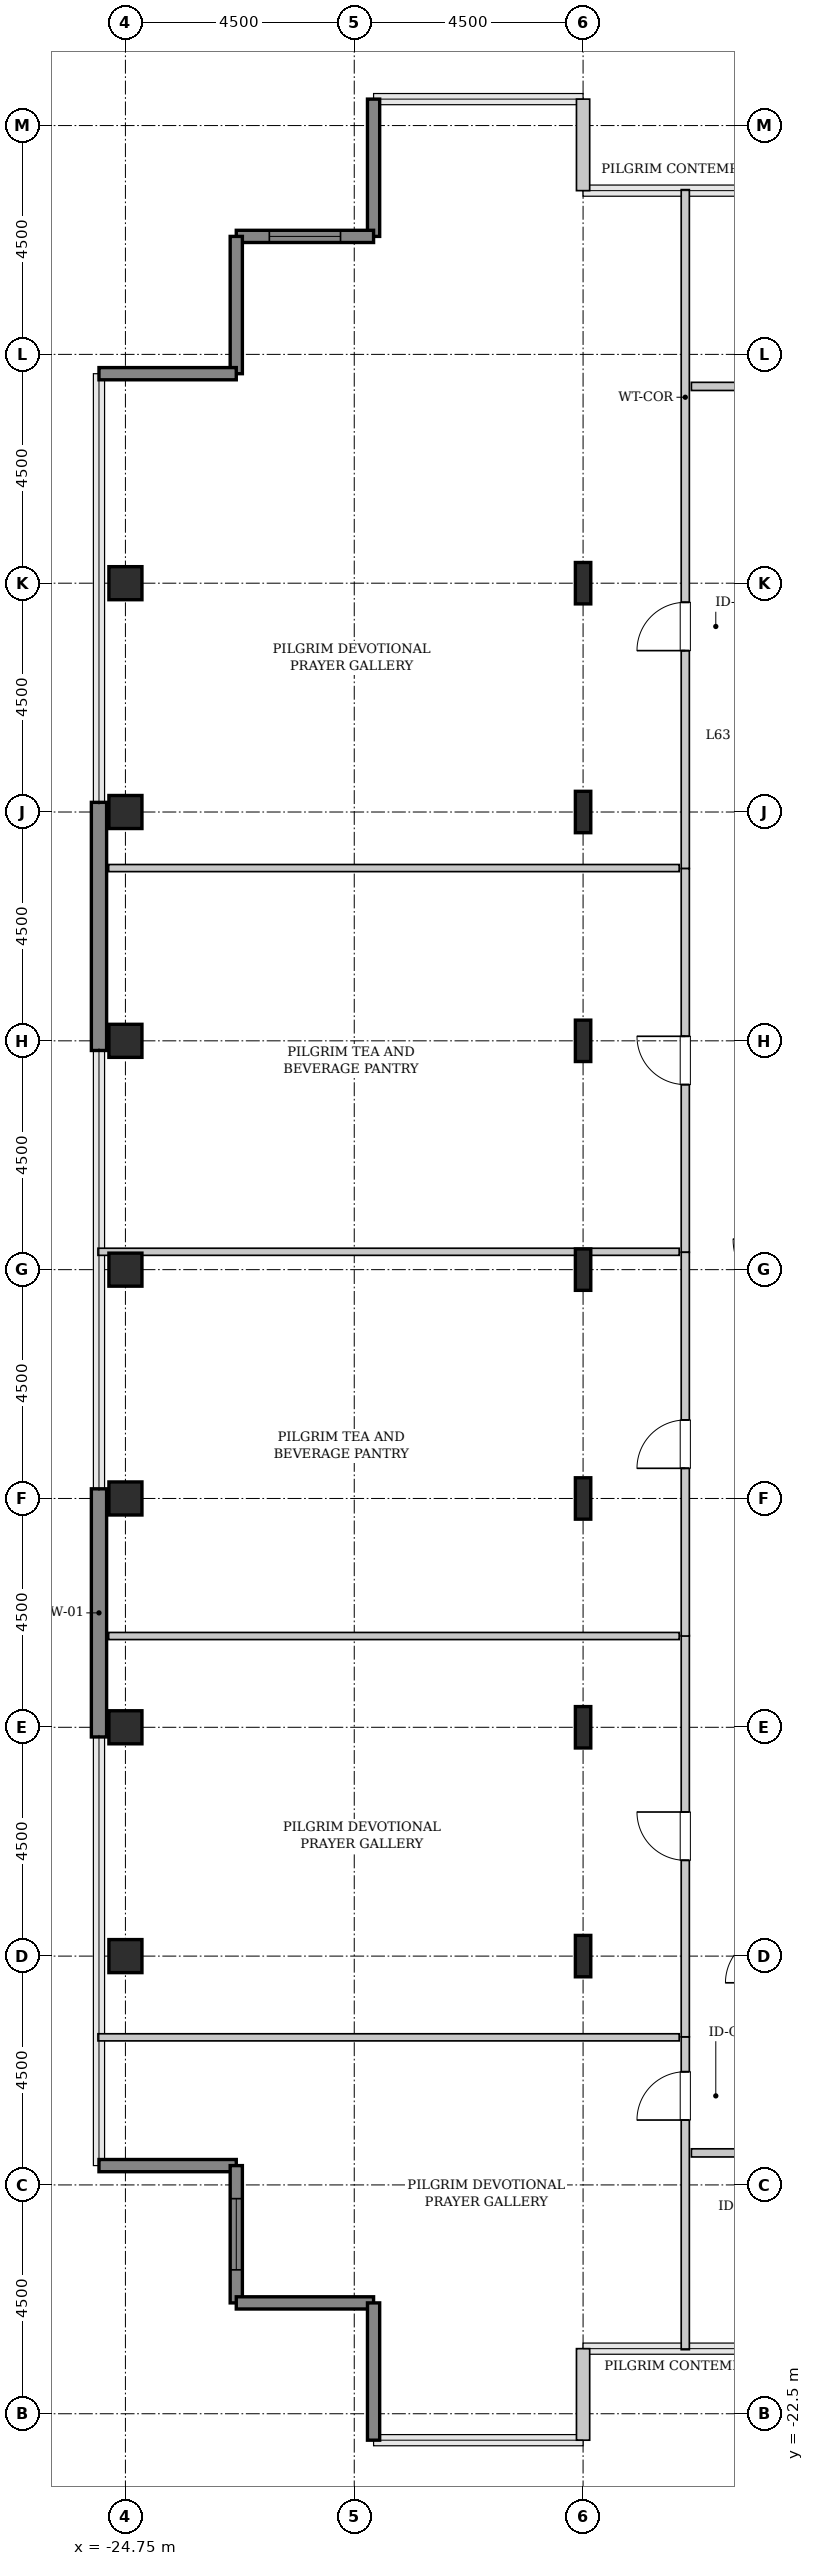
"""IFC4 building model, lengths in metres.
Left out: names, types, materials, properties, quantities, classifications, styles, units other than length and angle.
Written with IfcOpenShell. Run it as: python <this file> out.ifc"""

import sys

from ifc_helpers import new_model, si_unit, direction, frame, frame_2d, origin, origin_2d, place, context, subcontext, project, spatial, rectangle, hollow_rectangle, i_section, extrude, source, transform, mapped, element, fill, save


model = new_model("IFC4")
c1 = context("Model", 3, precision=1e-05, world=origin(), true_north=direction((0.0, 1.0)))
c2 = subcontext(c1, "Body", "Model", "MODEL_VIEW")
j1 = project(units=[si_unit("LENGTHUNIT", "METRE"), si_unit("PLANEANGLEUNIT", "RADIAN")], contexts=[c1])
p1 = place(None, origin())
s1 = spatial("IfcSite", under=j1, at=p1, CompositionType="ELEMENT")
p2 = place(p1, origin())
s2 = spatial("IfcBuilding", under=s1, at=p2, CompositionType="ELEMENT")
p3 = place(p2, frame((0.0, 0.0, 252.2)))
s3 = spatial("IfcBuildingStorey", under=s2, at=p3, CompositionType="ELEMENT", Elevation=252.2)
m1 = source(origin(), c2, "Body", "SweptSolid", [
    extrude(hollow_rectangle(XDim=0.65, YDim=0.65, WallThickness=0.032, InnerFilletRadius=0.032, OuterFilletRadius=0.064, at=origin_2d()), origin(), (0.0, 0.0, 1.0), 3.8),
])
for number, where, z_axis, x_axis in (
    (1, (-24.75, -13.5, 0.0), (0.0, 0.0, 1.0), (1.0, 0.0, 0.0)),
    (2, (-24.75, -9.0, 0.0), (0.0, 0.0, 1.0), (1.0, 0.0, 0.0)),
    (3, (-24.75, -4.5, 0.0), (0.0, 0.0, 1.0), (1.0, 0.0, 0.0)),
    (4, (-24.75, 0.0, 0.0), (0.0, 0.0, 1.0), (1.0, 0.0, 0.0)),
    (5, (-24.75, 4.5, 0.0), (0.0, 0.0, 1.0), (1.0, 0.0, 0.0)),
    (6, (-24.75, 9.0, 0.0), (0.0, 0.0, 1.0), (1.0, 0.0, 0.0)),
    (7, (-24.75, 13.5, 0.0), (0.0, 0.0, 1.0), (1.0, 0.0, 0.0)),
):
    element("IfcColumn", number, at=place(p3, frame(where, z_axis=z_axis, x_axis=x_axis)), inside=s3, PredefinedType="COLUMN", context=c2, shape_type="MappedRepresentation", body=[
        mapped(m1, transform((0.0, 0.0, 0.0), x_axis=(1.0, 0.0, 0.0), y_axis=(0.0, 1.0, 0.0), z_axis=(0.0, 0.0, 1.0), scale=1.0)),
    ])
m2 = source(origin(), c2, "Body", "SweptSolid", [
    extrude(i_section(OverallWidth=0.303, OverallDepth=0.814, WebThickness=0.021, FlangeThickness=0.04, FilletRadius=0.03, at=origin_2d()), origin(), (0.0, 0.0, 1.0), 3.8),
])
for number, where, z_axis, x_axis in (
    (8, (-15.75, -13.5, 0.0), (0.0, 0.0, 1.0), (1.0, 0.0, 0.0)),
    (9, (-15.75, -9.0, 0.0), (0.0, 0.0, 1.0), (1.0, 0.0, 0.0)),
    (10, (-15.75, -4.5, 0.0), (0.0, 0.0, 1.0), (1.0, 0.0, 0.0)),
    (11, (-15.75, 0.0, 0.0), (0.0, 0.0, 1.0), (1.0, 0.0, 0.0)),
    (12, (-15.75, 4.5, 0.0), (0.0, 0.0, 1.0), (1.0, 0.0, 0.0)),
    (13, (-15.75, 9.0, 0.0), (0.0, 0.0, 1.0), (1.0, 0.0, 0.0)),
    (14, (-15.75, 13.5, 0.0), (0.0, 0.0, 1.0), (1.0, 0.0, 0.0)),
):
    element("IfcColumn", number, at=place(p3, frame(where, z_axis=z_axis, x_axis=x_axis)), inside=s3, PredefinedType="COLUMN", context=c2, shape_type="MappedRepresentation", body=[
        mapped(m2, transform((0.0, 0.0, 0.0), x_axis=(1.0, 0.0, 0.0), y_axis=(0.0, 1.0, 0.0), z_axis=(0.0, 0.0, 1.0), scale=1.0)),
    ])
m3 = source(origin(), c2, "Body", "SweptSolid", [
    extrude(rectangle(XDim=4.88, YDim=0.3, at=frame_2d((2.44, 0.0))), origin(), (0.0, 0.0, 1.0), 3.55),
])
for number, where, z_axis, x_axis in (
    (15, (-25.27, -9.19, 0.0), (0.0, 0.0, 1.0), (0.0, 1.0, 0.0)),
    (16, (-25.27, 4.31, 0.0), (0.0, 0.0, 1.0), (0.0, 1.0, 0.0)),
):
    element("IfcWall", number, at=place(p3, frame(where, z_axis=z_axis, x_axis=x_axis)), inside=s3, PredefinedType="SHEAR", context=c2, shape_type="MappedRepresentation", body=[
        mapped(m3, transform((0.0, 0.0, 0.0), x_axis=(1.0, 0.0, 0.0), y_axis=(0.0, 1.0, 0.0), z_axis=(0.0, 0.0, 1.0), scale=1.0)),
    ])
m4 = source(origin(), c2, "Body", "SweptSolid", [
    extrude(rectangle(XDim=1.8, YDim=0.26, at=frame_2d((0.9, 0.0))), origin(), (0.0, 0.0, 1.0), 3.55),
])
p4 = place(p3, frame((-15.75, 21.22, 0.0), z_axis=(0.0, 0.0, 1.0), x_axis=(0.0, 1.0, 0.0)))
e17 = element("IfcWall", 17, at=p4, inside=s3, PredefinedType="SOLIDWALL", context=c2, shape_type="MappedRepresentation", body=[
    mapped(m4, transform((0.0, 0.0, 0.0), x_axis=(1.0, 0.0, 0.0), y_axis=(0.0, 1.0, 0.0), z_axis=(0.0, 0.0, 1.0), scale=1.0)),
])
m5 = source(origin(), c2, "Body", "SweptSolid", [
    extrude(rectangle(XDim=2.7, YDim=0.24, at=frame_2d((1.35, 0.0))), origin(), (0.0, 0.0, 1.0), 3.55),
])
p5 = place(p3, frame((-19.87, 23.02, 0.0), z_axis=(0.0, 0.0, 1.0), x_axis=(0.0, -1.0, 0.0)))
e18 = element("IfcWall", 18, at=p5, inside=s3, PredefinedType="SHEAR", context=c2, shape_type="MappedRepresentation", body=[
    mapped(m5, transform((0.0, 0.0, 0.0), x_axis=(1.0, 0.0, 0.0), y_axis=(0.0, 1.0, 0.0), z_axis=(0.0, 0.0, 1.0), scale=1.0)),
])
p6 = place(p3, frame((-19.87, 20.32, 0.0), z_axis=(0.0, 0.0, 1.0), x_axis=(-1.0, 0.0, 0.0)))
e19 = element("IfcWall", 19, at=p6, inside=s3, PredefinedType="SHEAR", context=c2, shape_type="MappedRepresentation", body=[
    mapped(m5, transform((0.0, 0.0, 0.0), x_axis=(1.0, 0.0, 0.0), y_axis=(0.0, 1.0, 0.0), z_axis=(0.0, 0.0, 1.0), scale=1.0)),
])
p7 = place(p6, frame((0.65, 0.0, 0.85)))
e20 = element("IfcOpeningElement", 20, at=p7, cuts=e19, PredefinedType="OPENING", context=c2, shape_type="SweptSolid", body=[
    extrude(rectangle(XDim=1.4, YDim=1.8, at=frame_2d((0.7, 0.9))), frame((0.0, 0.13, 0.0), z_axis=(0.0, -1.0, 0.0), x_axis=(1.0, 0.0, 0.0)), (0.0, 0.0, 1.0), 0.26),
])
for number, where, z_axis, x_axis in (
    (21, (-22.57, 20.32, 0.0), (0.0, 0.0, 1.0), (0.0, -1.0, 0.0)),
    (22, (-22.57, 17.62, 0.0), (0.0, 0.0, 1.0), (-1.0, 0.0, 0.0)),
    (23, (-25.27, -17.62, 0.0), (0.0, 0.0, 1.0), (1.0, 0.0, 0.0)),
):
    element("IfcWall", number, at=place(p3, frame(where, z_axis=z_axis, x_axis=x_axis)), inside=s3, PredefinedType="SHEAR", context=c2, shape_type="MappedRepresentation", body=[
        mapped(m5, transform((0.0, 0.0, 0.0), x_axis=(1.0, 0.0, 0.0), y_axis=(0.0, 1.0, 0.0), z_axis=(0.0, 0.0, 1.0), scale=1.0)),
    ])
p8 = place(p3, frame((-22.57, -17.62, 0.0), z_axis=(0.0, 0.0, 1.0), x_axis=(0.0, -1.0, 0.0)))
e24 = element("IfcWall", 24, at=p8, inside=s3, PredefinedType="SHEAR", context=c2, shape_type="MappedRepresentation", body=[
    mapped(m5, transform((0.0, 0.0, 0.0), x_axis=(1.0, 0.0, 0.0), y_axis=(0.0, 1.0, 0.0), z_axis=(0.0, 0.0, 1.0), scale=1.0)),
])
p9 = place(p8, frame((0.65, 0.0, 0.85)))
e25 = element("IfcOpeningElement", 25, at=p9, cuts=e24, PredefinedType="OPENING", context=c2, shape_type="SweptSolid", body=[
    extrude(rectangle(XDim=1.4, YDim=1.8, at=frame_2d((0.7, 0.9))), frame((0.0, 0.13, 0.0), z_axis=(0.0, -1.0, 0.0), x_axis=(1.0, 0.0, 0.0)), (0.0, 0.0, 1.0), 0.26),
])
for number, where, z_axis, x_axis in (
    (26, (-22.57, -20.32, 0.0), (0.0, 0.0, 1.0), (1.0, 0.0, 0.0)),
    (27, (-19.87, -20.32, 0.0), (0.0, 0.0, 1.0), (0.0, -1.0, 0.0)),
):
    element("IfcWall", number, at=place(p3, frame(where, z_axis=z_axis, x_axis=x_axis)), inside=s3, PredefinedType="SHEAR", context=c2, shape_type="MappedRepresentation", body=[
        mapped(m5, transform((0.0, 0.0, 0.0), x_axis=(1.0, 0.0, 0.0), y_axis=(0.0, 1.0, 0.0), z_axis=(0.0, 0.0, 1.0), scale=1.0)),
    ])
p10 = place(p3, frame((-15.75, -23.02, 0.0), z_axis=(0.0, 0.0, 1.0), x_axis=(0.0, 1.0, 0.0)))
e28 = element("IfcWall", 28, at=p10, inside=s3, PredefinedType="SOLIDWALL", context=c2, shape_type="MappedRepresentation", body=[
    mapped(m4, transform((0.0, 0.0, 0.0), x_axis=(1.0, 0.0, 0.0), y_axis=(0.0, 1.0, 0.0), z_axis=(0.0, 0.0, 1.0), scale=1.0)),
])
m6 = source(origin(), c2, "Body", "SweptSolid", [
    extrude(rectangle(XDim=6.153, YDim=0.16, at=frame_2d((3.076, 0.0))), origin(), (0.0, 0.0, 1.0), 3.535),
])
p11 = place(p3, frame((-13.74, -21.24, 0.0), z_axis=(0.0, 0.0, 1.0), x_axis=(0.0, 1.0, 0.0)))
e29 = element("IfcWall", 29, at=p11, inside=s3, PredefinedType="PARTITIONING", context=c2, shape_type="MappedRepresentation", body=[
    mapped(m6, transform((0.0, 0.0, 0.0), x_axis=(1.0, 0.0, 0.0), y_axis=(0.0, 1.0, 0.0), z_axis=(0.0, 0.0, 1.0), scale=1.0)),
])
p12 = place(p11, frame((4.516, 0.0, 0.0)))
e30 = element("IfcOpeningElement", 30, at=p12, cuts=e29, PredefinedType="OPENING", context=c2, shape_type="SweptSolid", body=[
    extrude(rectangle(XDim=0.95, YDim=2.1, at=frame_2d((0.475, 1.05))), frame((0.0, 0.09, 0.0), z_axis=(0.0, -1.0, 0.0), x_axis=(1.0, 0.0, 0.0)), (0.0, 0.0, 1.0), 0.18),
])
m7 = source(origin(), c2, "Body", "SweptSolid", [
    extrude(rectangle(XDim=11.43, YDim=0.14, at=frame_2d((5.715, 0.0))), origin(), (0.0, 0.0, 1.0), 3.535),
])
p13 = place(p3, frame((-25.29, -15.097, 0.0), z_axis=(0.0, 0.0, 1.0), x_axis=(1.0, 0.0, 0.0)))
e31 = element("IfcWall", 31, at=p13, inside=s3, PredefinedType="PARTITIONING", context=c2, shape_type="MappedRepresentation", body=[
    mapped(m7, transform((0.0, 0.0, 0.0), x_axis=(1.0, 0.0, 0.0), y_axis=(0.0, 1.0, 0.0), z_axis=(0.0, 0.0, 1.0), scale=1.0)),
])
m8 = source(origin(), c2, "Body", "SweptSolid", [
    extrude(rectangle(XDim=7.892, YDim=0.16, at=frame_2d((3.946, 0.0))), origin(), (0.0, 0.0, 1.0), 3.535),
])
p14 = place(p3, frame((-13.74, -15.087, 0.0), z_axis=(0.0, 0.0, 1.0), x_axis=(0.0, 1.0, 0.0)))
e32 = element("IfcWall", 32, at=p14, inside=s3, PredefinedType="PARTITIONING", context=c2, shape_type="MappedRepresentation", body=[
    mapped(m8, transform((0.0, 0.0, 0.0), x_axis=(1.0, 0.0, 0.0), y_axis=(0.0, 1.0, 0.0), z_axis=(0.0, 0.0, 1.0), scale=1.0)),
])
p15 = place(p14, frame((3.471, 0.0, 0.0)))
e33 = element("IfcOpeningElement", 33, at=p15, cuts=e32, PredefinedType="OPENING", context=c2, shape_type="SweptSolid", body=[
    extrude(rectangle(XDim=0.95, YDim=2.1, at=frame_2d((0.475, 1.05))), frame((0.0, 0.09, 0.0), z_axis=(0.0, -1.0, 0.0), x_axis=(1.0, 0.0, 0.0)), (0.0, 0.0, 1.0), 0.18),
])
m9 = source(origin(), c2, "Body", "SweptSolid", [
    extrude(rectangle(XDim=11.22, YDim=0.14, at=frame_2d((5.61, 0.0))), origin(), (0.0, 0.0, 1.0), 3.535),
])
p16 = place(p3, frame((-25.08, -7.205, 0.0), z_axis=(0.0, 0.0, 1.0), x_axis=(1.0, 0.0, 0.0)))
e34 = element("IfcWall", 34, at=p16, inside=s3, PredefinedType="PARTITIONING", context=c2, shape_type="MappedRepresentation", body=[
    mapped(m9, transform((0.0, 0.0, 0.0), x_axis=(1.0, 0.0, 0.0), y_axis=(0.0, 1.0, 0.0), z_axis=(0.0, 0.0, 1.0), scale=1.0)),
])
m10 = source(origin(), c2, "Body", "SweptSolid", [
    extrude(rectangle(XDim=13.353, YDim=0.16, at=frame_2d((6.676, 0.0))), origin(), (0.0, 0.0, 1.0), 3.535),
])
p17 = place(p3, frame((-13.74, 7.887, 0.0), z_axis=(0.0, 0.0, 1.0), x_axis=(0.0, 1.0, 0.0)))
e35 = element("IfcWall", 35, at=p17, inside=s3, PredefinedType="PARTITIONING", context=c2, shape_type="MappedRepresentation", body=[
    mapped(m10, transform((0.0, 0.0, 0.0), x_axis=(1.0, 0.0, 0.0), y_axis=(0.0, 1.0, 0.0), z_axis=(0.0, 0.0, 1.0), scale=1.0)),
])
p18 = place(p17, frame((4.286, 0.0, 0.0)))
e36 = element("IfcOpeningElement", 36, at=p18, cuts=e35, PredefinedType="OPENING", context=c2, shape_type="SweptSolid", body=[
    extrude(rectangle(XDim=0.95, YDim=2.1, at=frame_2d((0.475, 1.05))), frame((0.0, 0.09, 0.0), z_axis=(0.0, -1.0, 0.0), x_axis=(1.0, 0.0, 0.0)), (0.0, 0.0, 1.0), 0.18),
])
p19 = place(p3, frame((-25.08, 7.897, 0.0), z_axis=(0.0, 0.0, 1.0), x_axis=(1.0, 0.0, 0.0)))
e37 = element("IfcWall", 37, at=p19, inside=s3, PredefinedType="PARTITIONING", context=c2, shape_type="MappedRepresentation", body=[
    mapped(m9, transform((0.0, 0.0, 0.0), x_axis=(1.0, 0.0, 0.0), y_axis=(0.0, 1.0, 0.0), z_axis=(0.0, 0.0, 1.0), scale=1.0)),
])
m11 = source(origin(), c2, "Body", "SweptSolid", [
    extrude(rectangle(XDim=7.546, YDim=0.16, at=frame_2d((3.773, 0.0))), origin(), (0.0, 0.0, 1.0), 3.535),
])
p20 = place(p3, frame((-13.74, 0.341, 0.0), z_axis=(0.0, 0.0, 1.0), x_axis=(0.0, 1.0, 0.0)))
e38 = element("IfcWall", 38, at=p20, inside=s3, PredefinedType="PARTITIONING", context=c2, shape_type="MappedRepresentation", body=[
    mapped(m11, transform((0.0, 0.0, 0.0), x_axis=(1.0, 0.0, 0.0), y_axis=(0.0, 1.0, 0.0), z_axis=(0.0, 0.0, 1.0), scale=1.0)),
])
p21 = place(p20, frame((3.298, 0.0, 0.0)))
e39 = element("IfcOpeningElement", 39, at=p21, cuts=e38, PredefinedType="OPENING", context=c2, shape_type="SweptSolid", body=[
    extrude(rectangle(XDim=0.95, YDim=2.1, at=frame_2d((0.475, 1.05))), frame((0.0, 0.09, 0.0), z_axis=(0.0, -1.0, 0.0), x_axis=(1.0, 0.0, 0.0)), (0.0, 0.0, 1.0), 0.18),
])
m12 = source(origin(), c2, "Body", "SweptSolid", [
    extrude(rectangle(XDim=11.43, YDim=0.14, at=frame_2d((5.715, 0.0))), origin(), (0.0, 0.0, 1.0), 2.925),
])
p22 = place(p3, frame((-25.29, 0.351, 0.0), z_axis=(0.0, 0.0, 1.0), x_axis=(1.0, 0.0, 0.0)))
e40 = element("IfcWall", 40, at=p22, inside=s3, PredefinedType="PARTITIONING", context=c2, shape_type="MappedRepresentation", body=[
    mapped(m12, transform((0.0, 0.0, 0.0), x_axis=(1.0, 0.0, 0.0), y_axis=(0.0, 1.0, 0.0), z_axis=(0.0, 0.0, 1.0), scale=1.0)),
])
m13 = source(origin(), c2, "Body", "SweptSolid", [
    extrude(rectangle(XDim=7.546, YDim=0.16, at=frame_2d((3.773, 0.0))), origin(), (0.0, 0.0, 1.0), 3.535),
])
p23 = place(p3, frame((-13.74, -7.205, 0.0), z_axis=(0.0, 0.0, 1.0), x_axis=(0.0, 1.0, 0.0)))
e41 = element("IfcWall", 41, at=p23, inside=s3, PredefinedType="PARTITIONING", context=c2, shape_type="MappedRepresentation", body=[
    mapped(m13, transform((0.0, 0.0, 0.0), x_axis=(1.0, 0.0, 0.0), y_axis=(0.0, 1.0, 0.0), z_axis=(0.0, 0.0, 1.0), scale=1.0)),
])
p24 = place(p23, frame((3.298, 0.0, 0.0)))
e42 = element("IfcOpeningElement", 42, at=p24, cuts=e41, PredefinedType="OPENING", context=c2, shape_type="SweptSolid", body=[
    extrude(rectangle(XDim=0.95, YDim=2.1, at=frame_2d((0.475, 1.05))), frame((0.0, 0.09, 0.0), z_axis=(0.0, -1.0, 0.0), x_axis=(1.0, 0.0, 0.0)), (0.0, 0.0, 1.0), 0.18),
])
m14 = source(origin(), c2, "Body", "SweptSolid", [
    extrude(rectangle(XDim=4.16, YDim=0.16, at=frame_2d((2.08, 0.0))), origin(), (0.0, 0.0, 1.0), 3.535),
])
p25 = place(p3, frame((-13.62, 17.37, 0.0), z_axis=(0.0, 0.0, 1.0), x_axis=(1.0, 0.0, 0.0)))
e43 = element("IfcWall", 43, at=p25, inside=s3, PredefinedType="PARTITIONING", context=c2, shape_type="MappedRepresentation", body=[
    mapped(m14, transform((0.0, 0.0, 0.0), x_axis=(1.0, 0.0, 0.0), y_axis=(0.0, 1.0, 0.0), z_axis=(0.0, 0.0, 1.0), scale=1.0)),
])
p26 = place(p25, frame((0.969, 0.0, 0.0)))
e44 = element("IfcOpeningElement", 44, at=p26, cuts=e43, PredefinedType="OPENING", context=c2, shape_type="SweptSolid", body=[
    extrude(rectangle(XDim=0.95, YDim=2.1, at=frame_2d((0.475, 1.05))), frame((0.0, 0.09, 0.0), z_axis=(0.0, -1.0, 0.0), x_axis=(1.0, 0.0, 0.0)), (0.0, 0.0, 1.0), 0.18),
])
m15 = source(origin(), c2, "Body", "SweptSolid", [
    extrude(rectangle(XDim=3.625, YDim=0.16, at=frame_2d((1.812, 0.0))), origin(), (0.0, 0.0, 1.0), 3.535),
])
p27 = place(p3, frame((-13.62, -17.37, 0.0), z_axis=(0.0, 0.0, 1.0), x_axis=(1.0, 0.0, 0.0)))
e45 = element("IfcWall", 45, at=p27, inside=s3, PredefinedType="PARTITIONING", context=c2, shape_type="MappedRepresentation", body=[
    mapped(m15, transform((0.0, 0.0, 0.0), x_axis=(1.0, 0.0, 0.0), y_axis=(0.0, 1.0, 0.0), z_axis=(0.0, 0.0, 1.0), scale=1.0)),
])
p28 = place(p27, frame((0.999, 0.0, 0.0)))
e46 = element("IfcOpeningElement", 46, at=p28, cuts=e45, PredefinedType="OPENING", context=c2, shape_type="SweptSolid", body=[
    extrude(rectangle(XDim=0.95, YDim=2.1, at=frame_2d((0.475, 1.05))), frame((0.0, 0.09, 0.0), z_axis=(0.0, -1.0, 0.0), x_axis=(1.0, 0.0, 0.0)), (0.0, 0.0, 1.0), 0.18),
])
m16 = source(origin(), c2, "Body", "SweptSolid", [
    extrude(rectangle(XDim=1.4, YDim=1.8, at=frame_2d((0.7, 0.9))), frame((0.0, 0.03, 0.0), z_axis=(0.0, -1.0, 0.0), x_axis=(1.0, 0.0, 0.0)), (0.0, 0.0, 1.0), 0.06),
])
p29 = place(p7, origin())
e47 = element("IfcWindow", 47, at=p29, inside=s3, PartitioningType="SINGLE_PANEL", PredefinedType="WINDOW", context=c2, shape_type="MappedRepresentation", body=[
    mapped(m16, transform((0.0, 0.0, 0.0), x_axis=(1.0, 0.0, 0.0), y_axis=(0.0, 1.0, 0.0), z_axis=(0.0, 0.0, 1.0), scale=1.0)),
])
fill(e20, e47)
p30 = place(p9, origin())
e48 = element("IfcWindow", 48, at=p30, inside=s3, PartitioningType="SINGLE_PANEL", PredefinedType="WINDOW", context=c2, shape_type="MappedRepresentation", body=[
    mapped(m16, transform((0.0, 0.0, 0.0), x_axis=(1.0, 0.0, 0.0), y_axis=(0.0, 1.0, 0.0), z_axis=(0.0, 0.0, 1.0), scale=1.0)),
])
fill(e25, e48)
m17 = source(origin(), c2, "Body", "SweptSolid", [
    extrude(rectangle(XDim=0.95, YDim=2.1, at=frame_2d((0.475, 1.05))), frame((0.0, 0.025, 0.0), z_axis=(0.0, -1.0, 0.0), x_axis=(1.0, 0.0, 0.0)), (0.0, 0.0, 1.0), 0.05),
])
p31 = place(p12, origin())
e49 = element("IfcDoor", 49, at=p31, inside=s3, OperationType="SINGLE_SWING_LEFT", PredefinedType="DOOR", context=c2, shape_type="MappedRepresentation", body=[
    mapped(m17, transform((0.0, 0.0, 0.0), x_axis=(1.0, 0.0, 0.0), y_axis=(0.0, 1.0, 0.0), z_axis=(0.0, 0.0, 1.0), scale=1.0)),
])
fill(e30, e49)
p32 = place(p15, origin())
e50 = element("IfcDoor", 50, at=p32, inside=s3, OperationType="SINGLE_SWING_RIGHT", PredefinedType="DOOR", context=c2, shape_type="MappedRepresentation", body=[
    mapped(m17, transform((0.0, 0.0, 0.0), x_axis=(1.0, 0.0, 0.0), y_axis=(0.0, 1.0, 0.0), z_axis=(0.0, 0.0, 1.0), scale=1.0)),
])
fill(e33, e50)
p33 = place(p18, origin())
e51 = element("IfcDoor", 51, at=p33, inside=s3, OperationType="SINGLE_SWING_LEFT", PredefinedType="DOOR", context=c2, shape_type="MappedRepresentation", body=[
    mapped(m17, transform((0.0, 0.0, 0.0), x_axis=(1.0, 0.0, 0.0), y_axis=(0.0, 1.0, 0.0), z_axis=(0.0, 0.0, 1.0), scale=1.0)),
])
fill(e36, e51)
p34 = place(p21, origin())
e52 = element("IfcDoor", 52, at=p34, inside=s3, OperationType="SINGLE_SWING_RIGHT", PredefinedType="DOOR", context=c2, shape_type="MappedRepresentation", body=[
    mapped(m17, transform((0.0, 0.0, 0.0), x_axis=(1.0, 0.0, 0.0), y_axis=(0.0, 1.0, 0.0), z_axis=(0.0, 0.0, 1.0), scale=1.0)),
])
fill(e39, e52)
p35 = place(p24, origin())
e53 = element("IfcDoor", 53, at=p35, inside=s3, OperationType="SINGLE_SWING_LEFT", PredefinedType="DOOR", context=c2, shape_type="MappedRepresentation", body=[
    mapped(m17, transform((0.0, 0.0, 0.0), x_axis=(1.0, 0.0, 0.0), y_axis=(0.0, 1.0, 0.0), z_axis=(0.0, 0.0, 1.0), scale=1.0)),
])
fill(e42, e53)
save(model, sys.argv[1])
